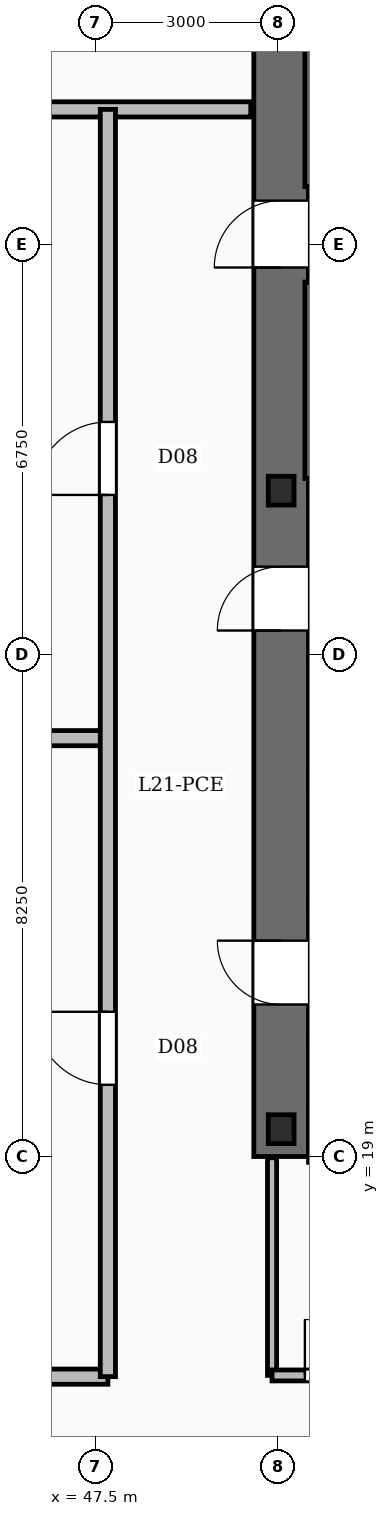
"""IFC4 building model, lengths in metres.
Left out: names, types, materials, properties, quantities, classifications, styles, units other than length and angle.
Written with IfcOpenShell. Run it as: python <this file> out.ifc"""

import sys

from ifc_helpers import new_model, si_unit, direction, frame, frame_2d, origin, origin_2d, place, context, subcontext, project, spatial, rectangle, i_section, extrude, element, fill, save


model = new_model("IFC4")
c1 = context("Model", 3, precision=1e-05, world=origin(), true_north=direction((0.0, 1.0)))
c2 = subcontext(c1, "Body", "Model", "MODEL_VIEW")
j1 = project(units=[si_unit("LENGTHUNIT", "METRE"), si_unit("PLANEANGLEUNIT", "RADIAN")], contexts=[c1])
p1 = place(None, origin())
s1 = spatial("IfcSite", under=j1, at=p1, CompositionType="ELEMENT")
p2 = place(p1, origin())
s2 = spatial("IfcBuilding", under=s1, at=p2, CompositionType="ELEMENT")
p3 = place(p2, frame((0.0, 0.0, 94.5)))
s3 = spatial("IfcBuildingStorey", under=s2, at=p3, CompositionType="ELEMENT", Elevation=94.5)
p4 = place(p3, frame((50.55, 19.0, -0.42), z_axis=(0.0, 0.0, 1.0), x_axis=(0.0, 1.0, 0.0)))
e1 = element("IfcWall", 1, at=p4, inside=s3, PredefinedType="SHEAR", context=c2, shape_type="SweptSolid", body=[
    extrude(rectangle(XDim=20.8, YDim=0.9, at=frame_2d((10.4, 0.0))), origin(), (0.0, 0.0, 1.0), 5.17),
])
p5 = place(p4, frame((2.5, 0.0, 0.42)))
e2 = element("IfcOpeningElement", 2, at=p5, cuts=e1, PredefinedType="OPENING", context=c2, shape_type="SweptSolid", body=[
    extrude(rectangle(XDim=1.05, YDim=2.15, at=frame_2d((0.525, 1.075))), frame((0.0, 0.46, 0.0), z_axis=(0.0, -1.0, 0.0), x_axis=(1.0, 0.0, 0.0)), (0.0, 0.0, 1.0), 0.92),
])
p6 = place(p4, frame((8.65, 0.0, 0.42)))
e3 = element("IfcOpeningElement", 3, at=p6, cuts=e1, PredefinedType="OPENING", context=c2, shape_type="SweptSolid", body=[
    extrude(rectangle(XDim=1.05, YDim=2.15, at=frame_2d((0.525, 1.075))), frame((0.0, 0.46, 0.0), z_axis=(0.0, -1.0, 0.0), x_axis=(1.0, 0.0, 0.0)), (0.0, 0.0, 1.0), 0.92),
])
p7 = place(p4, frame((14.62, 0.0, 0.42)))
e4 = element("IfcOpeningElement", 4, at=p7, cuts=e1, PredefinedType="OPENING", context=c2, shape_type="SweptSolid", body=[
    extrude(rectangle(XDim=1.1, YDim=2.15, at=frame_2d((0.55, 1.075))), frame((0.0, 0.46, 0.0), z_axis=(0.0, -1.0, 0.0), x_axis=(1.0, 0.0, 0.0)), (0.0, 0.0, 1.0), 0.92),
])
p8 = place(p3, frame((51.0, 19.45, -0.42), z_axis=(0.0, 0.0, 1.0), x_axis=(1.0, 0.0, 0.0)))
e5 = element("IfcWall", 5, at=p8, inside=s3, PredefinedType="SHEAR", context=c2, shape_type="SweptSolid", body=[
    extrude(rectangle(XDim=8.9, YDim=0.9, at=frame_2d((4.45, 0.0))), origin(), (0.0, 0.0, 1.0), 5.17),
])
for number, where, z_axis, x_axis in (
    (6, (50.55, 19.45, -0.42), (0.0, 0.0, 1.0), (1.0, 0.0, 0.0)),
    (7, (50.55, 29.95, -0.42), (0.0, 0.0, 1.0), (1.0, 0.0, 0.0)),
):
    element("IfcColumn", number, at=place(p3, frame(where, z_axis=z_axis, x_axis=x_axis)), inside=s3, PredefinedType="COLUMN", context=c2, shape_type="SweptSolid", body=[
        extrude(i_section(OverallWidth=0.424, OverallDepth=0.474, WebThickness=0.048, FlangeThickness=0.077, FilletRadius=0.02, at=origin_2d()), origin(), (0.0, 0.0, 1.0), 5.17),
    ])
p9 = place(p3, frame((59.9, 30.03, 0.0), z_axis=(0.0, 0.0, 1.0), x_axis=(-1.0, 0.0, 0.0)))
e8 = element("IfcWall", 8, at=p9, inside=s3, PredefinedType="SOLIDWALL", context=c2, shape_type="SweptSolid", body=[
    extrude(rectangle(XDim=8.9, YDim=0.24, at=frame_2d((4.45, 0.0))), origin(), (0.0, 0.0, 1.0), 4.75),
])
p10 = place(p9, frame((7.38, 0.0, 0.0)))
e9 = element("IfcOpeningElement", 9, at=p10, cuts=e8, PredefinedType="OPENING", context=c2, shape_type="SweptSolid", body=[
    extrude(rectangle(XDim=1.1, YDim=2.15, at=frame_2d((0.55, 1.075))), frame((0.0, 0.13, 0.0), z_axis=(0.0, -1.0, 0.0), x_axis=(1.0, 0.0, 0.0)), (0.0, 0.0, 1.0), 0.26),
])
p11 = place(p3, frame((51.0, 33.5, 0.0), z_axis=(0.0, 0.0, 1.0), x_axis=(1.0, 0.0, 0.0)))
e10 = element("IfcWall", 10, at=p11, inside=s3, PredefinedType="SOLIDWALL", context=c2, shape_type="SweptSolid", body=[
    extrude(rectangle(XDim=8.9, YDim=0.24, at=frame_2d((4.45, 0.0))), origin(), (0.0, 0.0, 1.0), 4.75),
])
p12 = place(p3, frame((51.06, 30.15, 0.0), z_axis=(0.0, 0.0, 1.0), x_axis=(0.0, 1.0, 0.0)))
e11 = element("IfcWall", 11, at=p12, inside=s3, PredefinedType="SOLIDWALL", context=c2, shape_type="SweptSolid", body=[
    extrude(rectangle(XDim=3.23, YDim=0.24, at=frame_2d((1.615, 0.0))), origin(), (0.0, 0.0, 1.0), 4.75),
])
p13 = place(p3, frame((59.9, 34.83, 0.0), z_axis=(0.0, 0.0, 1.0), x_axis=(-1.0, 0.0, 0.0)))
e12 = element("IfcWall", 12, at=p13, inside=s3, PredefinedType="SOLIDWALL", context=c2, shape_type="SweptSolid", body=[
    extrude(rectangle(XDim=8.9, YDim=0.24, at=frame_2d((4.45, 0.0))), origin(), (0.0, 0.0, 1.0), 4.75),
])
p14 = place(p13, frame((7.42, 0.0, 0.0)))
e13 = element("IfcOpeningElement", 13, at=p14, cuts=e12, PredefinedType="OPENING", context=c2, shape_type="SweptSolid", body=[
    extrude(rectangle(XDim=1.1, YDim=2.15, at=frame_2d((0.55, 1.075))), frame((0.0, 0.13, 0.0), z_axis=(0.0, -1.0, 0.0), x_axis=(1.0, 0.0, 0.0)), (0.0, 0.0, 1.0), 0.26),
])
p15 = place(p3, frame((51.06, 34.95, 0.0), z_axis=(0.0, 0.0, 1.0), x_axis=(0.0, 1.0, 0.0)))
e14 = element("IfcWall", 14, at=p15, inside=s3, PredefinedType="SOLIDWALL", context=c2, shape_type="SweptSolid", body=[
    extrude(rectangle(XDim=3.15, YDim=0.24, at=frame_2d((1.575, 0.0))), origin(), (0.0, 0.0, 1.0), 4.75),
])
for number, where, z_axis, x_axis in (
    (15, (51.0, 20.905, 0.0), (0.0, 0.0, 1.0), (1.0, 0.0, 0.0)),
    (16, (51.0, 18.995, 0.0), (0.0, 0.0, 1.0), (1.0, 0.0, 0.0)),
):
    element("IfcWall", number, at=place(p3, frame(where, z_axis=z_axis, x_axis=x_axis)), inside=s3, PredefinedType="SOLIDWALL", context=c2, shape_type="SweptSolid", body=[
        extrude(rectangle(XDim=2.79, YDim=0.18, at=frame_2d((1.395, 0.0))), origin(), (0.0, 0.0, 1.0), 4.75),
    ])
for number, where, z_axis, x_axis in (
    (17, (51.0, 25.055, 0.0), (0.0, 0.0, 1.0), (1.0, 0.0, 0.0)),
    (18, (51.0, 23.145, 0.0), (0.0, 0.0, 1.0), (1.0, 0.0, 0.0)),
):
    element("IfcWall", number, at=place(p3, frame(where, z_axis=z_axis, x_axis=x_axis)), inside=s3, PredefinedType="SOLIDWALL", context=c2, shape_type="SweptSolid", body=[
        extrude(rectangle(XDim=2.778, YDim=0.18, at=frame_2d((1.389, 0.0))), origin(), (0.0, 0.0, 1.0), 4.75),
    ])
p16 = place(p3, frame((51.0, 27.155, 0.0), z_axis=(0.0, 0.0, 1.0), x_axis=(1.0, 0.0, 0.0)))
e19 = element("IfcWall", 19, at=p16, inside=s3, PredefinedType="SOLIDWALL", context=c2, shape_type="SweptSolid", body=[
    extrude(rectangle(XDim=2.865, YDim=0.18, at=frame_2d((1.433, 0.0))), origin(), (0.0, 0.0, 1.0), 4.75),
])
p17 = place(p16, frame((0.785, 0.0, 0.0)))
e20 = element("IfcOpeningElement", 20, at=p17, cuts=e19, PredefinedType="OPENING", context=c2, shape_type="SweptSolid", body=[
    extrude(rectangle(XDim=1.35, YDim=2.3, at=frame_2d((0.675, 1.15))), frame((0.0, 0.1, 0.0), z_axis=(0.0, -1.0, 0.0), x_axis=(1.0, 0.0, 0.0)), (0.0, 0.0, 1.0), 0.2),
])
p18 = place(p3, frame((51.0, 25.245, 0.0), z_axis=(0.0, 0.0, 1.0), x_axis=(1.0, 0.0, 0.0)))
e21 = element("IfcWall", 21, at=p18, inside=s3, PredefinedType="SOLIDWALL", context=c2, shape_type="SweptSolid", body=[
    extrude(rectangle(XDim=2.865, YDim=0.18, at=frame_2d((1.433, 0.0))), origin(), (0.0, 0.0, 1.0), 4.75),
])
p19 = place(p3, frame((50.4, 15.4, 0.0), z_axis=(0.0, 0.0, 1.0), x_axis=(1.0, 0.0, 0.0)))
e22 = element("IfcWall", 22, at=p19, inside=s3, PredefinedType="SOLIDWALL", context=c2, shape_type="SweptSolid", body=[
    extrude(rectangle(XDim=10.0, YDim=0.18, at=frame_2d((5.0, 0.0))), origin(), (0.0, 0.0, 1.0), 3.81),
])
p20 = place(p19, frame((0.54, 0.0, 0.0)))
e23 = element("IfcOpeningElement", 23, at=p20, cuts=e22, PredefinedType="OPENING", context=c2, shape_type="SweptSolid", body=[
    extrude(rectangle(XDim=0.92, YDim=2.1, at=frame_2d((0.46, 1.05))), frame((0.0, 0.1, 0.0), z_axis=(0.0, -1.0, 0.0), x_axis=(1.0, 0.0, 0.0)), (0.0, 0.0, 1.0), 0.2),
])
p21 = place(p19, frame((2.54, 0.0, 0.0)))
e24 = element("IfcOpeningElement", 24, at=p21, cuts=e22, PredefinedType="OPENING", context=c2, shape_type="SweptSolid", body=[
    extrude(rectangle(XDim=0.92, YDim=2.1, at=frame_2d((0.46, 1.05))), frame((0.0, 0.1, 0.0), z_axis=(0.0, -1.0, 0.0), x_axis=(1.0, 0.0, 0.0)), (0.0, 0.0, 1.0), 0.2),
])
p22 = place(p19, frame((4.54, 0.0, 0.0)))
e25 = element("IfcOpeningElement", 25, at=p22, cuts=e22, PredefinedType="OPENING", context=c2, shape_type="SweptSolid", body=[
    extrude(rectangle(XDim=0.92, YDim=2.1, at=frame_2d((0.46, 1.05))), frame((0.0, 0.1, 0.0), z_axis=(0.0, -1.0, 0.0), x_axis=(1.0, 0.0, 0.0)), (0.0, 0.0, 1.0), 0.2),
])
p23 = place(p19, frame((6.54, 0.0, 0.0)))
e26 = element("IfcOpeningElement", 26, at=p23, cuts=e22, PredefinedType="OPENING", context=c2, shape_type="SweptSolid", body=[
    extrude(rectangle(XDim=0.92, YDim=2.1, at=frame_2d((0.46, 1.05))), frame((0.0, 0.1, 0.0), z_axis=(0.0, -1.0, 0.0), x_axis=(1.0, 0.0, 0.0)), (0.0, 0.0, 1.0), 0.2),
])
p24 = place(p19, frame((8.57, 0.0, 0.0)))
e27 = element("IfcOpeningElement", 27, at=p24, cuts=e22, PredefinedType="OPENING", context=c2, shape_type="SweptSolid", body=[
    extrude(rectangle(XDim=0.86, YDim=2.05, at=frame_2d((0.43, 1.025))), frame((0.0, 0.1, 0.0), z_axis=(0.0, -1.0, 0.0), x_axis=(1.0, 0.0, 0.0)), (0.0, 0.0, 1.0), 0.2),
])
p25 = place(p3, frame((50.4, 15.4, 0.0), z_axis=(0.0, 0.0, 1.0), x_axis=(0.0, 1.0, 0.0)))
e28 = element("IfcWall", 28, at=p25, inside=s3, PredefinedType="PARTITIONING", context=c2, shape_type="SweptSolid", body=[
    extrude(rectangle(XDim=3.58, YDim=0.15, at=frame_2d((1.79, 0.0))), origin(), (0.0, 0.0, 1.0), 3.81),
])
for number, where, z_axis, x_axis in (
    (29, (27.2, 25.88, 0.0), (0.0, 0.0, 1.0), (1.0, 0.0, 0.0)),
    (30, (27.2, 15.38, 0.0), (0.0, 0.0, 1.0), (1.0, 0.0, 0.0)),
):
    element("IfcWall", number, at=place(p3, frame(where, z_axis=z_axis, x_axis=x_axis)), inside=s3, PredefinedType="SOLIDWALL", context=c2, shape_type="SweptSolid", body=[
        extrude(rectangle(XDim=20.5, YDim=0.25, at=frame_2d((10.25, 0.0))), origin(), (0.0, 0.0, 1.0), 3.81),
    ])
p26 = place(p3, frame((24.85, 36.22, 0.0), z_axis=(0.0, 0.0, 1.0), x_axis=(1.0, 0.0, 0.0)))
e31 = element("IfcWall", 31, at=p26, inside=s3, PredefinedType="SOLIDWALL", context=c2, shape_type="SweptSolid", body=[
    extrude(rectangle(XDim=25.2, YDim=0.25, at=frame_2d((12.6, 0.0))), origin(), (0.0, 0.0, 1.0), 3.81),
])
p27 = place(p26, frame((0.55, 0.0, 0.0)))
e32 = element("IfcOpeningElement", 32, at=p27, cuts=e31, PredefinedType="OPENING", context=c2, shape_type="SweptSolid", body=[
    extrude(rectangle(XDim=1.2, YDim=2.2, at=frame_2d((0.6, 1.1))), frame((0.0, 0.135, 0.0), z_axis=(0.0, -1.0, 0.0), x_axis=(1.0, 0.0, 0.0)), (0.0, 0.0, 1.0), 0.27),
])
p28 = place(p3, frame((47.7, 15.38, 0.0), z_axis=(0.0, 0.0, 1.0), x_axis=(0.0, 1.0, 0.0)))
e33 = element("IfcWall", 33, at=p28, inside=s3, PredefinedType="SOLIDWALL", context=c2, shape_type="SweptSolid", body=[
    extrude(rectangle(XDim=20.84, YDim=0.25, at=frame_2d((10.42, 0.0))), origin(), (0.0, 0.0, 1.0), 3.81),
])
p29 = place(p28, frame((4.8, 0.0, 0.0)))
e34 = element("IfcOpeningElement", 34, at=p29, cuts=e33, PredefinedType="OPENING", context=c2, shape_type="SweptSolid", body=[
    extrude(rectangle(XDim=1.2, YDim=2.2, at=frame_2d((0.6, 1.1))), frame((0.0, 0.135, 0.0), z_axis=(0.0, -1.0, 0.0), x_axis=(1.0, 0.0, 0.0)), (0.0, 0.0, 1.0), 0.27),
])
p30 = place(p28, frame((14.5, 0.0, 0.0)))
e35 = element("IfcOpeningElement", 35, at=p30, cuts=e33, PredefinedType="OPENING", context=c2, shape_type="SweptSolid", body=[
    extrude(rectangle(XDim=1.2, YDim=2.2, at=frame_2d((0.6, 1.1))), frame((0.0, 0.135, 0.0), z_axis=(0.0, -1.0, 0.0), x_axis=(1.0, 0.0, 0.0)), (0.0, 0.0, 1.0), 0.27),
])
p31 = place(p5, origin())
e36 = element("IfcDoor", 36, at=p31, inside=s3, OperationType="SINGLE_SWING_RIGHT", PredefinedType="DOOR", context=c2, shape_type="SweptSolid", body=[
    extrude(rectangle(XDim=1.05, YDim=2.15, at=frame_2d((0.525, 1.075))), frame((0.0, 0.025, 0.0), z_axis=(0.0, -1.0, 0.0), x_axis=(1.0, 0.0, 0.0)), (0.0, 0.0, 1.0), 0.05),
])
fill(e2, e36)
p32 = place(p6, origin())
e37 = element("IfcDoor", 37, at=p32, inside=s3, OperationType="SINGLE_SWING_LEFT", PredefinedType="DOOR", context=c2, shape_type="SweptSolid", body=[
    extrude(rectangle(XDim=1.05, YDim=2.15, at=frame_2d((0.525, 1.075))), frame((0.0, 0.025, 0.0), z_axis=(0.0, -1.0, 0.0), x_axis=(1.0, 0.0, 0.0)), (0.0, 0.0, 1.0), 0.05),
])
fill(e3, e37)
p33 = place(p7, origin())
e38 = element("IfcDoor", 38, at=p33, inside=s3, OperationType="SINGLE_SWING_LEFT", PredefinedType="DOOR", context=c2, shape_type="SweptSolid", body=[
    extrude(rectangle(XDim=1.1, YDim=2.15, at=frame_2d((0.55, 1.075))), frame((0.0, 0.025, 0.0), z_axis=(0.0, -1.0, 0.0), x_axis=(1.0, 0.0, 0.0)), (0.0, 0.0, 1.0), 0.05),
])
fill(e4, e38)
p34 = place(p20, origin())
e39 = element("IfcDoor", 39, at=p34, inside=s3, OperationType="SINGLE_SWING_LEFT", PredefinedType="DOOR", context=c2, shape_type="SweptSolid", body=[
    extrude(rectangle(XDim=0.92, YDim=2.1, at=frame_2d((0.46, 1.05))), frame((0.0, 0.025, 0.0), z_axis=(0.0, -1.0, 0.0), x_axis=(1.0, 0.0, 0.0)), (0.0, 0.0, 1.0), 0.05),
])
fill(e23, e39)
p35 = place(p29, origin())
e40 = element("IfcDoor", 40, at=p35, inside=s3, OperationType="SINGLE_SWING_RIGHT", PredefinedType="DOOR", context=c2, shape_type="SweptSolid", body=[
    extrude(rectangle(XDim=1.2, YDim=2.2, at=frame_2d((0.6, 1.1))), frame((0.0, 0.025, 0.0), z_axis=(0.0, -1.0, 0.0), x_axis=(1.0, 0.0, 0.0)), (0.0, 0.0, 1.0), 0.05),
])
fill(e34, e40)
p36 = place(p30, origin())
e41 = element("IfcDoor", 41, at=p36, inside=s3, OperationType="SINGLE_SWING_LEFT", PredefinedType="DOOR", context=c2, shape_type="SweptSolid", body=[
    extrude(rectangle(XDim=1.2, YDim=2.2, at=frame_2d((0.6, 1.1))), frame((0.0, 0.025, 0.0), z_axis=(0.0, -1.0, 0.0), x_axis=(1.0, 0.0, 0.0)), (0.0, 0.0, 1.0), 0.05),
])
fill(e35, e41)
save(model, sys.argv[1])
